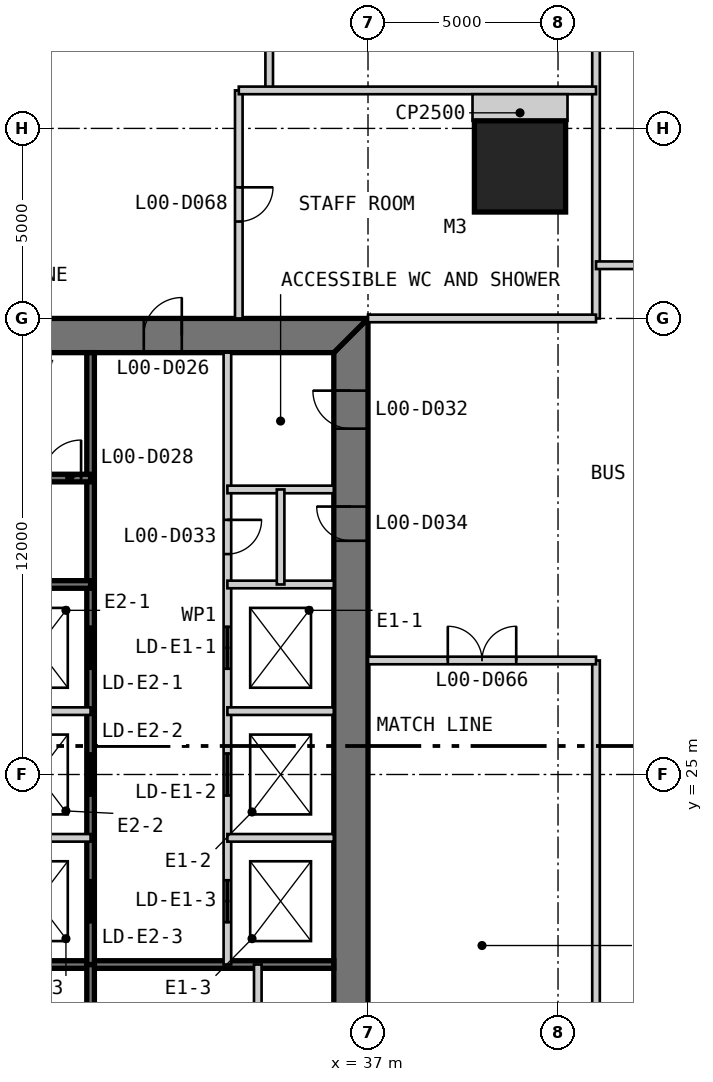
"""IFC4 building model, lengths in metres.
Left out: names, types, materials, properties, quantities, classifications, styles, units other than length and angle.
Written with IfcOpenShell. Run it as: python <this file> out.ifc"""

import sys

from ifc_helpers import new_model, si_unit, direction, frame, frame_2d, origin, origin_2d, place, context, subcontext, project, spatial, polyline, rectangle, outline, extrude, element, fill, save


model = new_model("IFC4")
c1 = context("Model", 3, precision=1e-05, world=origin(), true_north=direction((0.0, 1.0)))
c2 = subcontext(c1, "Body", "Model", "MODEL_VIEW")
j1 = project(units=[si_unit("LENGTHUNIT", "METRE"), si_unit("PLANEANGLEUNIT", "RADIAN")], contexts=[c1])
p1 = place(None, origin())
s1 = spatial("IfcSite", under=j1, at=p1, CompositionType="ELEMENT")
p2 = place(p1, origin())
s2 = spatial("IfcBuilding", under=s1, at=p2, CompositionType="ELEMENT")
p3 = place(p2, origin())
s3 = spatial("IfcBuildingStorey", under=s2, at=p3, CompositionType="ELEMENT", Elevation=0.0)
p4 = place(p3, frame((41.0, 41.0, 0.0), z_axis=(0.0, 0.0, 1.0), x_axis=(1.0, 0.0, 0.0)))
e1 = element("IfcColumn", 1, at=p4, inside=s3, PredefinedType="COLUMN", context=c2, shape_type="SweptSolid", body=[
    extrude(rectangle(XDim=2.4, YDim=2.4, at=origin_2d()), origin(), (0.0, 0.0, 1.0), 7.0),
])
p5 = place(p3, frame((36.55, 13.9, 0.0), z_axis=(0.0, 0.0, 1.0), x_axis=(0.0, 1.0, 0.0)))
e2 = element("IfcWall", 2, at=p5, inside=s3, PredefinedType="SHEAR", context=c2, shape_type="SweptSolid", body=[
    extrude(outline(polyline([(-0.9, -0.45), (23.1, -0.45), (22.2, 0.45), (0.0, 0.45), (-0.9, -0.45)])), origin(), (0.0, 0.0, 1.0), 7.0),
])
p6 = place(p5, frame((20.2, 0.0, 0.0)))
e3 = element("IfcOpeningElement", 3, at=p6, cuts=e2, PredefinedType="OPENING", context=c2, shape_type="SweptSolid", body=[
    extrude(rectangle(XDim=1.0, YDim=2.2, at=frame_2d((0.5, 1.1))), frame((0.0, 0.46, 0.0), z_axis=(0.0, -1.0, 0.0), x_axis=(1.0, 0.0, 0.0)), (0.0, 0.0, 1.0), 0.92),
])
p7 = place(p5, frame((17.25, 0.0, 0.0)))
e4 = element("IfcOpeningElement", 4, at=p7, cuts=e2, PredefinedType="OPENING", context=c2, shape_type="SweptSolid", body=[
    extrude(rectangle(XDim=0.9, YDim=2.2, at=frame_2d((0.45, 1.1))), frame((0.0, 0.46, 0.0), z_axis=(0.0, -1.0, 0.0), x_axis=(1.0, 0.0, 0.0)), (0.0, 0.0, 1.0), 0.92),
])
p8 = place(p3, frame((37.0, 36.55, 0.0), z_axis=(0.0, 0.0, 1.0), x_axis=(-1.0, 0.0, 0.0)))
e5 = element("IfcWall", 5, at=p8, inside=s3, PredefinedType="SHEAR", context=c2, shape_type="SweptSolid", body=[
    extrude(outline(polyline([(0.0, -0.45), (24.0, -0.45), (23.1, 0.45), (0.9, 0.45), (0.0, -0.45)])), origin(), (0.0, 0.0, 1.0), 7.0),
])
p9 = place(p8, frame((4.9, 0.0, 0.0)))
e6 = element("IfcOpeningElement", 6, at=p9, cuts=e5, PredefinedType="OPENING", context=c2, shape_type="SweptSolid", body=[
    extrude(rectangle(XDim=1.0, YDim=2.2, at=frame_2d((0.5, 1.1))), frame((0.0, 0.46, 0.0), z_axis=(0.0, -1.0, 0.0), x_axis=(1.0, 0.0, 0.0)), (0.0, 0.0, 1.0), 0.92),
])
p10 = place(p8, frame((8.9, 0.0, 0.0)))
e7 = element("IfcOpeningElement", 7, at=p10, cuts=e5, PredefinedType="OPENING", context=c2, shape_type="SweptSolid", body=[
    extrude(rectangle(XDim=1.1, YDim=2.2, at=frame_2d((0.55, 1.1))), frame((0.0, 0.46, 0.0), z_axis=(0.0, -1.0, 0.0), x_axis=(1.0, 0.0, 0.0)), (0.0, 0.0, 1.0), 0.92),
])
p11 = place(p8, frame((15.05, 0.0, 0.0)))
e8 = element("IfcOpeningElement", 8, at=p11, cuts=e5, PredefinedType="OPENING", context=c2, shape_type="SweptSolid", body=[
    extrude(rectangle(XDim=0.9, YDim=2.2, at=frame_2d((0.45, 1.1))), frame((0.0, 0.46, 0.0), z_axis=(0.0, -1.0, 0.0), x_axis=(1.0, 0.0, 0.0)), (0.0, 0.0, 1.0), 0.92),
])
p12 = place(p8, frame((17.9, 0.0, 0.0)))
e9 = element("IfcOpeningElement", 9, at=p12, cuts=e5, PredefinedType="OPENING", context=c2, shape_type="SweptSolid", body=[
    extrude(rectangle(XDim=1.0, YDim=2.2, at=frame_2d((0.5, 1.1))), frame((0.0, 0.46, 0.0), z_axis=(0.0, -1.0, 0.0), x_axis=(1.0, 0.0, 0.0)), (0.0, 0.0, 1.0), 0.92),
])
p13 = place(p8, frame((21.4, 0.0, 0.0)))
e10 = element("IfcOpeningElement", 10, at=p13, cuts=e5, PredefinedType="OPENING", context=c2, shape_type="SweptSolid", body=[
    extrude(rectangle(XDim=1.0, YDim=2.2, at=frame_2d((0.5, 1.1))), frame((0.0, 0.46, 0.0), z_axis=(0.0, -1.0, 0.0), x_axis=(1.0, 0.0, 0.0)), (0.0, 0.0, 1.0), 0.92),
])
p14 = place(p3, frame((20.3, 20.0, 0.0), z_axis=(0.0, 0.0, 1.0), x_axis=(1.0, 0.0, 0.0)))
e11 = element("IfcWall", 11, at=p14, inside=s3, PredefinedType="SOLIDWALL", context=c2, shape_type="SweptSolid", body=[
    extrude(rectangle(XDim=15.8, YDim=0.2, at=frame_2d((7.9, 0.0))), origin(), (0.0, 0.0, 1.0), 6.8),
])
p15 = place(p3, frame((29.7, 13.9, 0.0), z_axis=(0.0, 0.0, 1.0), x_axis=(0.0, 1.0, 0.0)))
e12 = element("IfcWall", 12, at=p15, inside=s3, PredefinedType="SOLIDWALL", context=c2, shape_type="SweptSolid", body=[
    extrude(rectangle(XDim=6.1, YDim=0.2, at=frame_2d((3.05, 0.0))), origin(), (0.0, 0.0, 1.0), 6.8),
])
p16 = place(p3, frame((34.1, 13.9, 0.0), z_axis=(0.0, 0.0, 1.0), x_axis=(0.0, 1.0, 0.0)))
e13 = element("IfcWall", 13, at=p16, inside=s3, PredefinedType="PARTITIONING", context=c2, shape_type="SweptSolid", body=[
    extrude(rectangle(XDim=6.1, YDim=0.2, at=frame_2d((3.05, 0.0))), origin(), (0.0, 0.0, 1.0), 6.8),
])
p17 = place(p3, frame((33.3, 36.1, 0.0), z_axis=(0.0, 0.0, 1.0), x_axis=(0.0, -1.0, 0.0)))
e14 = element("IfcWall", 14, at=p17, inside=s3, PredefinedType="PARTITIONING", context=c2, shape_type="SweptSolid", body=[
    extrude(rectangle(XDim=16.1, YDim=0.2, at=frame_2d((8.05, 0.0))), origin(), (0.0, 0.0, 1.0), 6.8),
])
p18 = place(p17, frame((4.4, 0.0, 0.0)))
e15 = element("IfcOpeningElement", 15, at=p18, cuts=e14, PredefinedType="OPENING", context=c2, shape_type="SweptSolid", body=[
    extrude(rectangle(XDim=0.9, YDim=2.2, at=frame_2d((0.45, 1.1))), frame((0.0, 0.11, 0.0), z_axis=(0.0, -1.0, 0.0), x_axis=(1.0, 0.0, 0.0)), (0.0, 0.0, 1.0), 0.22),
])
p19 = place(p17, frame((7.217, 0.0, 0.0)))
e16 = element("IfcOpeningElement", 16, at=p19, cuts=e14, PredefinedType="OPENING", context=c2, shape_type="SweptSolid", body=[
    extrude(rectangle(XDim=1.1, YDim=2.2, at=frame_2d((0.55, 1.1))), frame((0.0, 0.11, 0.0), z_axis=(0.0, -1.0, 0.0), x_axis=(1.0, 0.0, 0.0)), (0.0, 0.0, 1.0), 0.22),
])
p20 = place(p17, frame((10.55, 0.0, 0.0)))
e17 = element("IfcOpeningElement", 17, at=p20, cuts=e14, PredefinedType="OPENING", context=c2, shape_type="SweptSolid", body=[
    extrude(rectangle(XDim=1.1, YDim=2.2, at=frame_2d((0.55, 1.1))), frame((0.0, 0.11, 0.0), z_axis=(0.0, -1.0, 0.0), x_axis=(1.0, 0.0, 0.0)), (0.0, 0.0, 1.0), 0.22),
])
p21 = place(p17, frame((13.883, 0.0, 0.0)))
e18 = element("IfcOpeningElement", 18, at=p21, cuts=e14, PredefinedType="OPENING", context=c2, shape_type="SweptSolid", body=[
    extrude(rectangle(XDim=1.1, YDim=2.2, at=frame_2d((0.55, 1.1))), frame((0.0, 0.11, 0.0), z_axis=(0.0, -1.0, 0.0), x_axis=(1.0, 0.0, 0.0)), (0.0, 0.0, 1.0), 0.22),
])
p22 = place(p3, frame((29.7, 36.1, 0.0), z_axis=(0.0, 0.0, 1.0), x_axis=(0.0, -1.0, 0.0)))
e19 = element("IfcWall", 19, at=p22, inside=s3, PredefinedType="SOLIDWALL", context=c2, shape_type="SweptSolid", body=[
    extrude(rectangle(XDim=16.1, YDim=0.2, at=frame_2d((8.05, 0.0))), origin(), (0.0, 0.0, 1.0), 6.8),
])
p23 = place(p22, frame((7.217, 0.0, 0.0)))
e20 = element("IfcOpeningElement", 20, at=p23, cuts=e19, PredefinedType="OPENING", context=c2, shape_type="SweptSolid", body=[
    extrude(rectangle(XDim=1.1, YDim=2.2, at=frame_2d((0.55, 1.1))), frame((0.0, 0.11, 0.0), z_axis=(0.0, -1.0, 0.0), x_axis=(1.0, 0.0, 0.0)), (0.0, 0.0, 1.0), 0.22),
])
p24 = place(p22, frame((10.55, 0.0, 0.0)))
e21 = element("IfcOpeningElement", 21, at=p24, cuts=e19, PredefinedType="OPENING", context=c2, shape_type="SweptSolid", body=[
    extrude(rectangle(XDim=1.1, YDim=2.2, at=frame_2d((0.55, 1.1))), frame((0.0, 0.11, 0.0), z_axis=(0.0, -1.0, 0.0), x_axis=(1.0, 0.0, 0.0)), (0.0, 0.0, 1.0), 0.22),
])
p25 = place(p22, frame((13.883, 0.0, 0.0)))
e22 = element("IfcOpeningElement", 22, at=p25, cuts=e19, PredefinedType="OPENING", context=c2, shape_type="SweptSolid", body=[
    extrude(rectangle(XDim=1.1, YDim=2.2, at=frame_2d((0.55, 1.1))), frame((0.0, 0.11, 0.0), z_axis=(0.0, -1.0, 0.0), x_axis=(1.0, 0.0, 0.0)), (0.0, 0.0, 1.0), 0.22),
])
for number, where, z_axis, x_axis in (
    (23, (36.1, 30.0, 0.0), (0.0, 0.0, 1.0), (-1.0, 0.0, 0.0)),
    (24, (36.1, 26.667, 0.0), (0.0, 0.0, 1.0), (-1.0, 0.0, 0.0)),
    (25, (36.1, 23.333, 0.0), (0.0, 0.0, 1.0), (-1.0, 0.0, 0.0)),
    (26, (29.7, 26.667, 0.0), (0.0, 0.0, 1.0), (-1.0, 0.0, 0.0)),
    (27, (29.7, 23.333, 0.0), (0.0, 0.0, 1.0), (-1.0, 0.0, 0.0)),
):
    element("IfcWall", number, at=place(p3, frame(where, z_axis=z_axis, x_axis=x_axis)), inside=s3, PredefinedType="PARTITIONING", context=c2, shape_type="SweptSolid", body=[
        extrude(rectangle(XDim=2.8, YDim=0.2, at=frame_2d((1.4, 0.0))), origin(), (0.0, 0.0, 1.0), 6.8),
    ])
p26 = place(p3, frame((29.7, 32.8, 0.0), z_axis=(0.0, 0.0, 1.0), x_axis=(-1.0, 0.0, 0.0)))
e28 = element("IfcWall", 28, at=p26, inside=s3, PredefinedType="SOLIDWALL", context=c2, shape_type="SweptSolid", body=[
    extrude(rectangle(XDim=9.4, YDim=0.2, at=frame_2d((4.7, 0.0))), origin(), (0.0, 0.0, 1.0), 6.8),
])
p27 = place(p26, frame((0.25, 0.0, 0.0)))
e29 = element("IfcOpeningElement", 29, at=p27, cuts=e28, PredefinedType="OPENING", context=c2, shape_type="SweptSolid", body=[
    extrude(rectangle(XDim=1.0, YDim=2.2, at=frame_2d((0.5, 1.1))), frame((0.0, 0.11, 0.0), z_axis=(0.0, -1.0, 0.0), x_axis=(1.0, 0.0, 0.0)), (0.0, 0.0, 1.0), 0.22),
])
p28 = place(p3, frame((29.7, 30.0, 0.0), z_axis=(0.0, 0.0, 1.0), x_axis=(-1.0, 0.0, 0.0)))
e30 = element("IfcWall", 30, at=p28, inside=s3, PredefinedType="SOLIDWALL", context=c2, shape_type="SweptSolid", body=[
    extrude(rectangle(XDim=15.8, YDim=0.2, at=frame_2d((7.9, 0.0))), origin(), (0.0, 0.0, 1.0), 6.8),
])
p29 = place(p3, frame((36.1, 32.5, 0.0), z_axis=(0.0, 0.0, 1.0), x_axis=(-1.0, 0.0, 0.0)))
e31 = element("IfcWall", 31, at=p29, inside=s3, PredefinedType="PARTITIONING", context=c2, shape_type="SweptSolid", body=[
    extrude(rectangle(XDim=2.8, YDim=0.2, at=frame_2d((1.4, 0.0))), origin(), (0.0, 0.0, 1.0), 6.8),
])
p30 = place(p3, frame((34.7, 32.5, 0.0), z_axis=(0.0, 0.0, 1.0), x_axis=(0.0, -1.0, 0.0)))
e32 = element("IfcWall", 32, at=p30, inside=s3, PredefinedType="PARTITIONING", context=c2, shape_type="SweptSolid", body=[
    extrude(rectangle(XDim=2.5, YDim=0.2, at=frame_2d((1.25, 0.0))), origin(), (0.0, 0.0, 1.0), 6.8),
])
p31 = place(p3, frame((33.6, 37.0, 0.0), z_axis=(0.0, 0.0, 1.0), x_axis=(0.0, 1.0, 0.0)))
e33 = element("IfcWall", 33, at=p31, inside=s3, PredefinedType="PARTITIONING", context=c2, shape_type="SweptSolid", body=[
    extrude(rectangle(XDim=6.0, YDim=0.2, at=frame_2d((3.0, 0.0))), origin(), (0.0, 0.0, 1.0), 6.7),
])
p32 = place(p31, frame((2.55, 0.0, 0.0)))
e34 = element("IfcOpeningElement", 34, at=p32, cuts=e33, PredefinedType="OPENING", context=c2, shape_type="SweptSolid", body=[
    extrude(rectangle(XDim=0.9, YDim=2.2, at=frame_2d((0.45, 1.1))), frame((0.0, 0.11, 0.0), z_axis=(0.0, -1.0, 0.0), x_axis=(1.0, 0.0, 0.0)), (0.0, 0.0, 1.0), 0.22),
])
p33 = place(p3, frame((34.4, 43.0, 0.0), z_axis=(0.0, 0.0, 1.0), x_axis=(0.0, 1.0, 0.0)))
e35 = element("IfcWall", 35, at=p33, inside=s3, PredefinedType="PARTITIONING", context=c2, shape_type="SweptSolid", body=[
    extrude(rectangle(XDim=22.25, YDim=0.2, at=frame_2d((11.125, 0.0))), origin(), (0.0, 0.0, 1.0), 6.7),
])
p34 = place(p33, frame((6.425, 0.0, 0.0)))
e36 = element("IfcOpeningElement", 36, at=p34, cuts=e35, PredefinedType="OPENING", context=c2, shape_type="SweptSolid", body=[
    extrude(rectangle(XDim=1.8, YDim=2.4, at=frame_2d((0.9, 1.2))), frame((0.0, 0.11, 0.0), z_axis=(0.0, -1.0, 0.0), x_axis=(1.0, 0.0, 0.0)), (0.0, 0.0, 1.0), 0.22),
])
p35 = place(p33, frame((17.5, 0.0, 0.0)))
e37 = element("IfcOpeningElement", 37, at=p35, cuts=e35, PredefinedType="OPENING", context=c2, shape_type="SweptSolid", body=[
    extrude(rectangle(XDim=1.8, YDim=2.4, at=frame_2d((0.9, 1.2))), frame((0.0, 0.11, 0.0), z_axis=(0.0, -1.0, 0.0), x_axis=(1.0, 0.0, 0.0)), (0.0, 0.0, 1.0), 0.22),
])
p36 = place(p3, frame((43.0, -0.6, 0.0), z_axis=(0.0, 0.0, 1.0), x_axis=(0.0, 1.0, 0.0)))
e38 = element("IfcWall", 38, at=p36, inside=s3, PredefinedType="PARTITIONING", context=c2, shape_type="SweptSolid", body=[
    extrude(rectangle(XDim=28.6, YDim=0.2, at=frame_2d((14.3, 0.0))), origin(), (0.0, 0.0, 1.0), 6.043),
])
p37 = place(p3, frame((43.0, 37.0, 0.0), z_axis=(0.0, 0.0, 1.0), x_axis=(0.0, 1.0, 0.0)))
e39 = element("IfcWall", 39, at=p37, inside=s3, PredefinedType="PARTITIONING", context=c2, shape_type="SweptSolid", body=[
    extrude(rectangle(XDim=20.6, YDim=0.2, at=frame_2d((10.3, 0.0))), origin(), (0.0, 0.0, 1.0), 6.7),
])
p38 = place(p3, frame((37.0, 28.0, 0.0), z_axis=(0.0, 0.0, 1.0), x_axis=(1.0, 0.0, 0.0)))
e40 = element("IfcWall", 40, at=p38, inside=s3, PredefinedType="PARTITIONING", context=c2, shape_type="SweptSolid", body=[
    extrude(rectangle(XDim=6.0, YDim=0.2, at=frame_2d((3.0, 0.0))), origin(), (0.0, 0.0, 1.0), 6.7),
])
p39 = place(p38, frame((2.1, 0.0, 0.0)))
e41 = element("IfcOpeningElement", 41, at=p39, cuts=e40, PredefinedType="OPENING", context=c2, shape_type="SweptSolid", body=[
    extrude(rectangle(XDim=1.8, YDim=2.4, at=frame_2d((0.9, 1.2))), frame((0.0, 0.11, 0.0), z_axis=(0.0, -1.0, 0.0), x_axis=(1.0, 0.0, 0.0)), (0.0, 0.0, 1.0), 0.22),
])
p40 = place(p3, frame((37.0, 37.0, 0.0), z_axis=(0.0, 0.0, 1.0), x_axis=(1.0, 0.0, 0.0)))
e42 = element("IfcWall", 42, at=p40, inside=s3, PredefinedType="PARTITIONING", context=c2, shape_type="SweptSolid", body=[
    extrude(rectangle(XDim=6.0, YDim=0.2, at=frame_2d((3.0, 0.0))), origin(), (0.0, 0.0, 1.0), 5.853),
])
p41 = place(p3, frame((43.0, 38.4, 0.0), z_axis=(0.0, 0.0, 1.0), x_axis=(1.0, 0.0, 0.0)))
e43 = element("IfcWall", 43, at=p41, inside=s3, PredefinedType="PARTITIONING", context=c2, shape_type="SweptSolid", body=[
    extrude(rectangle(XDim=7.6, YDim=0.2, at=frame_2d((3.8, 0.0))), origin(), (0.0, 0.0, 1.0), 6.7),
])
p42 = place(p41, frame((2.9, 0.0, 0.0)))
e44 = element("IfcOpeningElement", 44, at=p42, cuts=e43, PredefinedType="OPENING", context=c2, shape_type="SweptSolid", body=[
    extrude(rectangle(XDim=1.8, YDim=2.4, at=frame_2d((0.9, 1.2))), frame((0.0, 0.11, 0.0), z_axis=(0.0, -1.0, 0.0), x_axis=(1.0, 0.0, 0.0)), (0.0, 0.0, 1.0), 0.22),
])
p43 = place(p3, frame((33.6, 43.0, 0.0), z_axis=(0.0, 0.0, 1.0), x_axis=(1.0, 0.0, 0.0)))
e45 = element("IfcWall", 45, at=p43, inside=s3, PredefinedType="PARTITIONING", context=c2, shape_type="SweptSolid", body=[
    extrude(rectangle(XDim=9.4, YDim=0.2, at=frame_2d((4.7, 0.0))), origin(), (0.0, 0.0, 1.0), 6.7),
])
p44 = place(p3, frame((41.0, 42.9, 0.0), z_axis=(0.0, 0.0, 1.0), x_axis=(0.0, -1.0, 0.0)))
e46 = element("IfcWall", 46, at=p44, inside=s3, PredefinedType="PARTITIONING", context=c2, shape_type="SweptSolid", body=[
    extrude(rectangle(XDim=0.7, YDim=2.5, at=frame_2d((0.35, 0.0))), origin(), (0.0, 0.0, 1.0), 6.7),
])
p45 = place(p9, frame((1.0, 0.0, 0.0), z_axis=(0.0, 0.0, 1.0), x_axis=(-1.0, 0.0, 0.0)))
e47 = element("IfcDoor", 47, at=p45, inside=s3, OperationType="SINGLE_SWING_RIGHT", PredefinedType="DOOR", context=c2, shape_type="SweptSolid", body=[
    extrude(rectangle(XDim=1.0, YDim=2.2, at=frame_2d((0.5, 1.1))), frame((0.0, 0.025, 0.0), z_axis=(0.0, -1.0, 0.0), x_axis=(1.0, 0.0, 0.0)), (0.0, 0.0, 1.0), 0.05),
    extrude(outline(polyline([(0.0, 0.0), (0.04, 0.0), (0.04, 2.16), (0.96, 2.16), (0.96, 0.0), (1.0, 0.0), (1.0, 2.2), (0.0, 2.2), (0.0, 0.0)])), frame((0.0, 0.3, 0.0), z_axis=(0.0, -1.0, 0.0), x_axis=(1.0, 0.0, 0.0)), (0.0, 0.0, 1.0), 0.6),
])
fill(e6, e47)
p46 = place(p27, frame((1.0, 0.0, 0.0), z_axis=(0.0, 0.0, 1.0), x_axis=(-1.0, 0.0, 0.0)))
e48 = element("IfcDoor", 48, at=p46, inside=s3, OperationType="SINGLE_SWING_RIGHT", PredefinedType="DOOR", context=c2, shape_type="SweptSolid", body=[
    extrude(rectangle(XDim=1.0, YDim=2.2, at=frame_2d((0.5, 1.1))), frame((0.0, 0.025, 0.0), z_axis=(0.0, -1.0, 0.0), x_axis=(1.0, 0.0, 0.0)), (0.0, 0.0, 1.0), 0.05),
])
fill(e29, e48)
p47 = place(p6, origin())
e49 = element("IfcDoor", 49, at=p47, inside=s3, OperationType="SINGLE_SWING_RIGHT", PredefinedType="DOOR", context=c2, shape_type="SweptSolid", body=[
    extrude(rectangle(XDim=1.0, YDim=2.2, at=frame_2d((0.5, 1.1))), frame((0.0, 0.025, 0.0), z_axis=(0.0, -1.0, 0.0), x_axis=(1.0, 0.0, 0.0)), (0.0, 0.0, 1.0), 0.05),
    extrude(outline(polyline([(0.0, 0.0), (0.04, 0.0), (0.04, 2.16), (0.96, 2.16), (0.96, 0.0), (1.0, 0.0), (1.0, 2.2), (0.0, 2.2), (0.0, 0.0)])), frame((0.0, 0.3, 0.0), z_axis=(0.0, -1.0, 0.0), x_axis=(1.0, 0.0, 0.0)), (0.0, 0.0, 1.0), 0.6),
])
fill(e3, e49)
p48 = place(p18, origin())
e50 = element("IfcDoor", 50, at=p48, inside=s3, OperationType="SINGLE_SWING_LEFT", PredefinedType="DOOR", context=c2, shape_type="SweptSolid", body=[
    extrude(rectangle(XDim=0.9, YDim=2.2, at=frame_2d((0.45, 1.1))), frame((0.0, 0.025, 0.0), z_axis=(0.0, -1.0, 0.0), x_axis=(1.0, 0.0, 0.0)), (0.0, 0.0, 1.0), 0.05),
])
fill(e15, e50)
p49 = place(p7, origin())
e51 = element("IfcDoor", 51, at=p49, inside=s3, OperationType="SINGLE_SWING_RIGHT", PredefinedType="DOOR", context=c2, shape_type="SweptSolid", body=[
    extrude(rectangle(XDim=0.9, YDim=2.2, at=frame_2d((0.45, 1.1))), frame((0.0, 0.025, 0.0), z_axis=(0.0, -1.0, 0.0), x_axis=(1.0, 0.0, 0.0)), (0.0, 0.0, 1.0), 0.05),
    extrude(outline(polyline([(0.0, 0.0), (0.04, 0.0), (0.04, 2.16), (0.86, 2.16), (0.86, 0.0), (0.9, 0.0), (0.9, 2.2), (0.0, 2.2), (0.0, 0.0)])), frame((0.0, 0.3, 0.0), z_axis=(0.0, -1.0, 0.0), x_axis=(1.0, 0.0, 0.0)), (0.0, 0.0, 1.0), 0.6),
])
fill(e4, e51)
p50 = place(p39, origin())
e52 = element("IfcDoor", 52, at=p50, inside=s3, OperationType="DOUBLE_DOOR_SINGLE_SWING", PredefinedType="DOOR", context=c2, shape_type="SweptSolid", body=[
    extrude(rectangle(XDim=1.8, YDim=2.4, at=frame_2d((0.9, 1.2))), frame((0.0, 0.025, 0.0), z_axis=(0.0, -1.0, 0.0), x_axis=(1.0, 0.0, 0.0)), (0.0, 0.0, 1.0), 0.05),
])
fill(e41, e52)
p51 = place(p32, frame((0.9, 0.0, 0.0), z_axis=(0.0, 0.0, 1.0), x_axis=(-1.0, 0.0, 0.0)))
e53 = element("IfcDoor", 53, at=p51, inside=s3, OperationType="SINGLE_SWING_LEFT", PredefinedType="DOOR", context=c2, shape_type="SweptSolid", body=[
    extrude(rectangle(XDim=0.9, YDim=2.2, at=frame_2d((0.45, 1.1))), frame((0.0, 0.025, 0.0), z_axis=(0.0, -1.0, 0.0), x_axis=(1.0, 0.0, 0.0)), (0.0, 0.0, 1.0), 0.05),
])
fill(e34, e53)
p52 = place(p19, origin())
e54 = element("IfcDoor", 54, at=p52, inside=s3, OperationType="DOUBLE_DOOR_SLIDING", PredefinedType="DOOR", context=c2, shape_type="SweptSolid", body=[
    extrude(rectangle(XDim=1.1, YDim=2.2, at=frame_2d((0.55, 1.1))), frame((0.0, 0.025, 0.0), z_axis=(0.0, -1.0, 0.0), x_axis=(1.0, 0.0, 0.0)), (0.0, 0.0, 1.0), 0.05),
])
fill(e16, e54)
p53 = place(p20, origin())
e55 = element("IfcDoor", 55, at=p53, inside=s3, OperationType="DOUBLE_DOOR_SLIDING", PredefinedType="DOOR", context=c2, shape_type="SweptSolid", body=[
    extrude(rectangle(XDim=1.1, YDim=2.2, at=frame_2d((0.55, 1.1))), frame((0.0, 0.025, 0.0), z_axis=(0.0, -1.0, 0.0), x_axis=(1.0, 0.0, 0.0)), (0.0, 0.0, 1.0), 0.05),
])
fill(e17, e55)
p54 = place(p21, origin())
e56 = element("IfcDoor", 56, at=p54, inside=s3, OperationType="DOUBLE_DOOR_SLIDING", PredefinedType="DOOR", context=c2, shape_type="SweptSolid", body=[
    extrude(rectangle(XDim=1.1, YDim=2.2, at=frame_2d((0.55, 1.1))), frame((0.0, 0.025, 0.0), z_axis=(0.0, -1.0, 0.0), x_axis=(1.0, 0.0, 0.0)), (0.0, 0.0, 1.0), 0.05),
])
fill(e18, e56)
p55 = place(p23, origin())
e57 = element("IfcDoor", 57, at=p55, inside=s3, OperationType="DOUBLE_DOOR_SLIDING", PredefinedType="DOOR", context=c2, shape_type="SweptSolid", body=[
    extrude(rectangle(XDim=1.1, YDim=2.2, at=frame_2d((0.55, 1.1))), frame((0.0, 0.025, 0.0), z_axis=(0.0, -1.0, 0.0), x_axis=(1.0, 0.0, 0.0)), (0.0, 0.0, 1.0), 0.05),
])
fill(e20, e57)
p56 = place(p24, origin())
e58 = element("IfcDoor", 58, at=p56, inside=s3, OperationType="DOUBLE_DOOR_SLIDING", PredefinedType="DOOR", context=c2, shape_type="SweptSolid", body=[
    extrude(rectangle(XDim=1.1, YDim=2.2, at=frame_2d((0.55, 1.1))), frame((0.0, 0.025, 0.0), z_axis=(0.0, -1.0, 0.0), x_axis=(1.0, 0.0, 0.0)), (0.0, 0.0, 1.0), 0.05),
])
fill(e21, e58)
p57 = place(p25, origin())
e59 = element("IfcDoor", 59, at=p57, inside=s3, OperationType="DOUBLE_DOOR_SLIDING", PredefinedType="DOOR", context=c2, shape_type="SweptSolid", body=[
    extrude(rectangle(XDim=1.1, YDim=2.2, at=frame_2d((0.55, 1.1))), frame((0.0, 0.025, 0.0), z_axis=(0.0, -1.0, 0.0), x_axis=(1.0, 0.0, 0.0)), (0.0, 0.0, 1.0), 0.05),
])
fill(e22, e59)
save(model, sys.argv[1])
